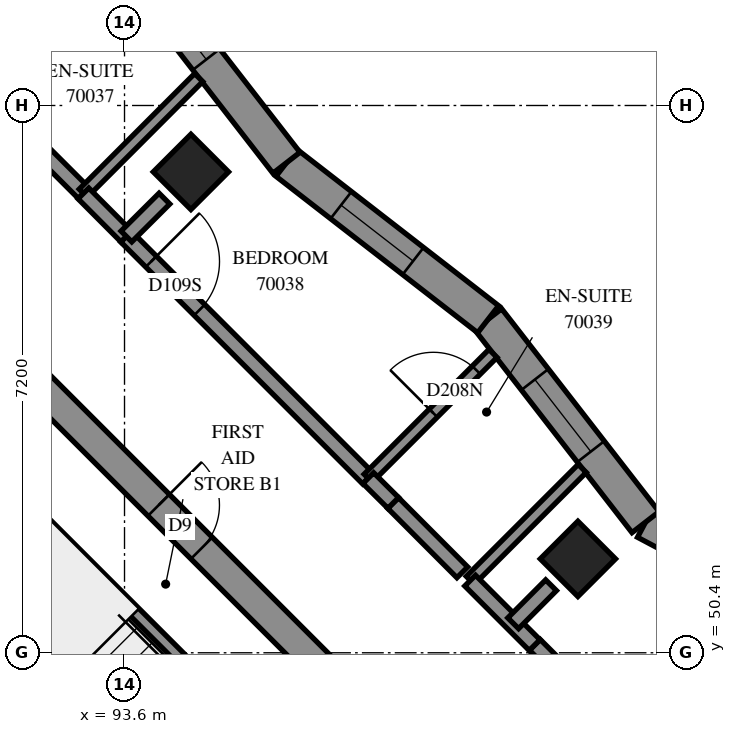
"""IFC4 building model, lengths in metres.
Left out: names, types, materials, properties, quantities, classifications, styles, units other than length and angle.
Written with IfcOpenShell. Run it as: python <this file> out.ifc"""

import sys

from ifc_helpers import new_model, si_unit, direction, frame, frame_2d, origin, origin_2d, place, context, subcontext, project, spatial, polyline, rectangle, outline, extrude, element, fill, save


model = new_model("IFC4")
c1 = context("Model", 3, precision=1e-05, world=origin(), true_north=direction((0.0, 1.0)))
c2 = subcontext(c1, "Body", "Model", "MODEL_VIEW")
j1 = project(units=[si_unit("LENGTHUNIT", "METRE"), si_unit("PLANEANGLEUNIT", "RADIAN")], contexts=[c1])
p1 = place(None, origin())
s1 = spatial("IfcSite", under=j1, at=p1, CompositionType="ELEMENT")
p2 = place(p1, origin())
s2 = spatial("IfcBuilding", under=s1, at=p2, CompositionType="ELEMENT")
p3 = place(p2, frame((0.0, 0.0, 257.4)))
s3 = spatial("IfcBuildingStorey", under=s2, at=p3, CompositionType="ELEMENT", Elevation=257.4)
for number, where, z_axis, x_axis in (
    (1, (94.474, 56.727, 0.0), (0.0, 0.0, 1.0), (0.707, -0.707, 0.0)),
    (2, (99.565, 51.635, 0.0), (0.0, 0.0, 1.0), (0.707, -0.707, 0.0)),
):
    element("IfcColumn", number, at=place(p3, frame(where, z_axis=z_axis, x_axis=x_axis)), inside=s3, PredefinedType="COLUMN", context=c2, shape_type="SweptSolid", body=[
        extrude(rectangle(XDim=0.7, YDim=0.7, at=origin_2d()), origin(), (0.0, 0.0, 1.0), 3.1),
    ])
p4 = place(p3, frame((86.695, 59.696, -0.3), z_axis=(0.0, 0.0, 1.0), x_axis=(0.7071100706, -0.7071034917, 0.0)))
e3 = element("IfcWall", 3, at=p4, inside=s3, PredefinedType="SHEAR", context=c2, shape_type="SweptSolid", body=[
    extrude(rectangle(XDim=15.2, YDim=0.4, at=frame_2d((7.6, 0.0))), origin(), (0.0, 0.0, 1.0), 2.7),
])
p5 = place(p4, frame((10.4, 0.0, 0.3)))
e4 = element("IfcOpeningElement", 4, at=p5, cuts=e3, PredefinedType="OPENING", context=c2, shape_type="SweptSolid", body=[
    extrude(rectangle(XDim=0.8, YDim=2.1, at=frame_2d((0.4, 1.05))), frame((0.0, 0.21, 0.0), z_axis=(0.0, -1.0, 0.0), x_axis=(1.0, 0.0, 0.0)), (0.0, 0.0, 1.0), 0.42),
])
p6 = place(p3, frame((88.958, 51.211, 0.0), z_axis=(0.0, 0.0, 1.0), x_axis=(0.7070998367, -0.7071137256, 0.0)))
e5 = element("IfcWall", 5, at=p6, inside=s3, PredefinedType="SOLIDWALL", context=c2, shape_type="SweptSolid", body=[
    extrude(rectangle(XDim=7.2, YDim=0.3, at=frame_2d((3.6, 0.0))), origin(), (0.0, 0.0, 1.0), 3.1),
])
p7 = place(p3, frame((99.246, 46.544, 0.0), z_axis=(0.0, 0.0, 1.0), x_axis=(0.7071067812, 0.7071067812, 0.0)))
e6 = element("IfcWall", 6, at=p7, inside=s3, PredefinedType="SOLIDWALL", context=c2, shape_type="SweptSolid", body=[
    extrude(outline(polyline([(0.225, -0.225), (6.046, -0.225), (5.437, 0.225), (-0.225, 0.225), (0.225, -0.225)])), origin(), (0.0, 0.0, 1.0), 3.1),
])
p8 = place(p7, frame((0.713, 0.0, 0.6)))
e7 = element("IfcOpeningElement", 7, at=p8, cuts=e6, PredefinedType="OPENING", context=c2, shape_type="SweptSolid", body=[
    extrude(rectangle(XDim=1.8, YDim=1.9, at=frame_2d((0.9, 0.95))), frame((0.0, 0.235, 0.0), z_axis=(0.0, -1.0, 0.0), x_axis=(1.0, 0.0, 0.0)), (0.0, 0.0, 1.0), 0.47),
])
p9 = place(p7, frame((3.931, 0.0, 0.6)))
e8 = element("IfcOpeningElement", 8, at=p9, cuts=e6, PredefinedType="OPENING", context=c2, shape_type="SweptSolid", body=[
    extrude(rectangle(XDim=1.2, YDim=1.9, at=frame_2d((0.6, 0.95))), frame((0.0, 0.235, 0.0), z_axis=(0.0, -1.0, 0.0), x_axis=(1.0, 0.0, 0.0)), (0.0, 0.0, 1.0), 0.47),
])
p10 = place(p3, frame((103.306, 50.604, 0.0), z_axis=(0.0, 0.0, 1.0), x_axis=(-0.8832472045, 0.468907641, 0.0)))
e9 = element("IfcWall", 9, at=p10, inside=s3, PredefinedType="SOLIDWALL", context=c2, shape_type="SweptSolid", body=[
    extrude(outline(polyline([(-0.304, -0.225), (3.181, -0.225), (3.277, 0.225), (0.304, 0.225), (-0.304, -0.225)])), origin(), (0.0, 0.0, 1.0), 3.1),
])
p11 = place(p10, frame((1.167, 0.0, 0.45)))
e10 = element("IfcOpeningElement", 10, at=p11, cuts=e9, PredefinedType="OPENING", context=c2, shape_type="SweptSolid", body=[
    extrude(rectangle(XDim=1.2, YDim=2.55, at=frame_2d((0.6, 1.275))), frame((0.0, 0.235, 0.0), z_axis=(0.0, -1.0, 0.0), x_axis=(1.0, 0.0, 0.0)), (0.0, 0.0, 1.0), 0.47),
])
p12 = place(p3, frame((100.454, 52.118, 0.0), z_axis=(0.0, 0.0, 1.0), x_axis=(-0.6128744429, 0.7901803068, 0.0)))
e11 = element("IfcWall", 11, at=p12, inside=s3, PredefinedType="SOLIDWALL", context=c2, shape_type="SweptSolid", body=[
    extrude(outline(polyline([(0.048, -0.225), (3.407, -0.225), (3.35, 0.225), (-0.048, 0.225), (0.048, -0.225)])), origin(), (0.0, 0.0, 1.0), 3.1),
])
p13 = place(p12, frame((1.175, 0.0, 0.45)))
e12 = element("IfcOpeningElement", 12, at=p13, cuts=e11, PredefinedType="OPENING", context=c2, shape_type="SweptSolid", body=[
    extrude(rectangle(XDim=1.2, YDim=2.55, at=frame_2d((0.6, 1.275))), frame((0.0, 0.235, 0.0), z_axis=(0.0, -1.0, 0.0), x_axis=(1.0, 0.0, 0.0)), (0.0, 0.0, 1.0), 0.47),
])
p14 = place(p3, frame((98.384, 54.788, 0.0), z_axis=(0.0, 0.0, 1.0), x_axis=(-0.7901691849, 0.6128887822, 0.0)))
e13 = element("IfcWall", 13, at=p14, inside=s3, PredefinedType="SOLIDWALL", context=c2, shape_type="SweptSolid", body=[
    extrude(outline(polyline([(-0.028, -0.225), (3.33, -0.225), (3.387, 0.225), (0.028, 0.225), (-0.028, -0.225)])), origin(), (0.0, 0.0, 1.0), 3.1),
])
p15 = place(p14, frame((1.249, 0.0, 0.45)))
e14 = element("IfcOpeningElement", 14, at=p15, cuts=e13, PredefinedType="OPENING", context=c2, shape_type="SweptSolid", body=[
    extrude(rectangle(XDim=1.2, YDim=2.55, at=frame_2d((0.6, 1.275))), frame((0.0, 0.235, 0.0), z_axis=(0.0, -1.0, 0.0), x_axis=(1.0, 0.0, 0.0)), (0.0, 0.0, 1.0), 0.47),
])
p16 = place(p3, frame((95.73, 56.846, 0.0), z_axis=(0.0, 0.0, 1.0), x_axis=(-0.612903202, 0.790158, 0.0)))
e15 = element("IfcWall", 15, at=p16, inside=s3, PredefinedType="SOLIDWALL", context=c2, shape_type="SweptSolid", body=[
    extrude(outline(polyline([(0.028, -0.225), (3.387, -0.225), (3.33, 0.225), (-0.028, 0.225), (0.028, -0.225)])), origin(), (0.0, 0.0, 1.0), 3.1),
])
p17 = place(p16, frame((1.72, 0.0, 0.45)))
e16 = element("IfcOpeningElement", 16, at=p17, cuts=e15, PredefinedType="OPENING", context=c2, shape_type="SweptSolid", body=[
    extrude(rectangle(XDim=1.2, YDim=2.55, at=frame_2d((0.6, 1.275))), frame((0.0, 0.235, 0.0), z_axis=(0.0, -1.0, 0.0), x_axis=(1.0, 0.0, 0.0)), (0.0, 0.0, 1.0), 0.47),
])
p18 = place(p3, frame((91.313, 53.354, 0.0), z_axis=(0.0, 0.0, 1.0), x_axis=(0.7071140275, -0.7070995348, 0.0)))
e17 = element("IfcWall", 17, at=p18, inside=s3, PredefinedType="PARTITIONING", context=c2, shape_type="SweptSolid", body=[
    extrude(rectangle(XDim=6.9, YDim=0.15, at=frame_2d((3.45, 0.0))), origin(), (0.0, 0.0, 1.0), 3.1),
])
p19 = place(p3, frame((88.537, 60.973, 0.0), z_axis=(0.0, 0.0, 1.0), x_axis=(0.7071067812, -0.7071067812, 0.0)))
e18 = element("IfcWall", 18, at=p19, inside=s3, PredefinedType="PARTITIONING", context=c2, shape_type="SweptSolid", body=[
    extrude(rectangle(XDim=6.401, YDim=0.2, at=frame_2d((3.2, 0.0))), origin(), (0.0, 0.0, 1.0), 3.1),
])
p20 = place(p19, frame((0.569, 0.0, 0.0)))
e19 = element("IfcOpeningElement", 19, at=p20, cuts=e18, PredefinedType="OPENING", context=c2, shape_type="SweptSolid", body=[
    extrude(rectangle(XDim=0.9, YDim=2.1, at=frame_2d((0.45, 1.05))), frame((0.0, 0.11, 0.0), z_axis=(0.0, -1.0, 0.0), x_axis=(1.0, 0.0, 0.0)), (0.0, 0.0, 1.0), 0.22),
])
p21 = place(p3, frame((93.621, 55.875, 0.0), z_axis=(0.0, 0.0, 1.0), x_axis=(0.7071067812, -0.7071067812, 0.0)))
e20 = element("IfcWall", 20, at=p21, inside=s3, PredefinedType="PARTITIONING", context=c2, shape_type="SweptSolid", body=[
    extrude(rectangle(XDim=4.5, YDim=0.2, at=frame_2d((2.25, 0.0))), origin(), (0.0, 0.0, 1.0), 3.1),
])
p22 = place(p21, frame((0.465, 0.0, 0.0)))
e21 = element("IfcOpeningElement", 21, at=p22, cuts=e20, PredefinedType="OPENING", context=c2, shape_type="SweptSolid", body=[
    extrude(rectangle(XDim=0.9, YDim=2.1, at=frame_2d((0.45, 1.05))), frame((0.0, 0.11, 0.0), z_axis=(0.0, -1.0, 0.0), x_axis=(1.0, 0.0, 0.0)), (0.0, 0.0, 1.0), 0.22),
])
p23 = place(p3, frame((91.716, 57.788, 0.0), z_axis=(0.0, 0.0, 1.0), x_axis=(0.7071067812, 0.7071067812, 0.0)))
e22 = element("IfcWall", 22, at=p23, inside=s3, PredefinedType="PARTITIONING", context=c2, shape_type="SweptSolid", body=[
    extrude(rectangle(XDim=2.345, YDim=0.15, at=frame_2d((1.172, 0.0))), origin(), (0.0, 0.0, 1.0), 3.1),
])
p24 = place(p23, frame((1.23, 0.0, 0.0)))
e23 = element("IfcOpeningElement", 23, at=p24, cuts=e22, PredefinedType="OPENING", context=c2, shape_type="SweptSolid", body=[
    extrude(rectangle(XDim=0.8, YDim=2.1, at=frame_2d((0.4, 1.05))), frame((0.0, 0.085, 0.0), z_axis=(0.0, -1.0, 0.0), x_axis=(1.0, 0.0, 0.0)), (0.0, 0.0, 1.0), 0.17),
])
p25 = place(p3, frame((96.806, 52.696, 0.0), z_axis=(0.0, 0.0, 1.0), x_axis=(0.7071067812, 0.7071067812, 0.0)))
e24 = element("IfcWall", 24, at=p25, inside=s3, PredefinedType="PARTITIONING", context=c2, shape_type="SweptSolid", body=[
    extrude(rectangle(XDim=2.322, YDim=0.15, at=frame_2d((1.161, 0.0))), origin(), (0.0, 0.0, 1.0), 3.1),
])
p26 = place(p25, frame((1.212, 0.0, 0.0)))
e25 = element("IfcOpeningElement", 25, at=p26, cuts=e24, PredefinedType="OPENING", context=c2, shape_type="SweptSolid", body=[
    extrude(rectangle(XDim=0.8, YDim=2.1, at=frame_2d((0.4, 1.05))), frame((0.0, 0.085, 0.0), z_axis=(0.0, -1.0, 0.0), x_axis=(1.0, 0.0, 0.0)), (0.0, 0.0, 1.0), 0.17),
])
p27 = place(p3, frame((93.057, 56.447, 0.0), z_axis=(0.0, 0.0, 1.0), x_axis=(0.7066180059, 0.7075952188, 0.0)))
e26 = element("IfcWall", 26, at=p27, inside=s3, PredefinedType="PARTITIONING", context=c2, shape_type="SweptSolid", body=[
    extrude(rectangle(XDim=2.149, YDim=0.15, at=frame_2d((1.075, 0.0))), origin(), (0.0, 0.0, 1.0), 3.1),
])
p28 = place(p3, frame((98.149, 51.353, 0.0), z_axis=(0.0, 0.0, 1.0), x_axis=(0.7070827679, 0.7071307936, 0.0)))
e27 = element("IfcWall", 27, at=p28, inside=s3, PredefinedType="PARTITIONING", context=c2, shape_type="SweptSolid", body=[
    extrude(rectangle(XDim=2.082, YDim=0.15, at=frame_2d((1.041, 0.0))), origin(), (0.0, 0.0, 1.0), 3.1),
])
p29 = place(p3, frame((98.998, 50.504, 0.0), z_axis=(0.0, 0.0, 1.0), x_axis=(0.7076063266, -0.7066068826, 0.0)))
e28 = element("IfcWall", 28, at=p29, inside=s3, PredefinedType="PARTITIONING", context=c2, shape_type="SweptSolid", body=[
    extrude(rectangle(XDim=2.001, YDim=0.2, at=frame_2d((1.001, 0.0))), origin(), (0.0, 0.0, 1.0), 3.1),
])
p30 = place(p3, frame((97.134, 52.37, 0.0), z_axis=(0.0, 0.0, 1.0), x_axis=(0.7063301682, -0.7078825422, 0.0)))
e29 = element("IfcWall", 29, at=p30, inside=s3, PredefinedType="PARTITIONING", context=c2, shape_type="SweptSolid", body=[
    extrude(rectangle(XDim=1.288, YDim=0.2, at=frame_2d((0.644, 0.0))), origin(), (0.0, 0.0, 1.0), 3.1),
])
p31 = place(p3, frame((98.147, 51.349, 0.0), z_axis=(0.0, 0.0, 1.0), x_axis=(0.7071067812, -0.7071067812, 0.0)))
e30 = element("IfcWall", 30, at=p31, inside=s3, PredefinedType="PARTITIONING", context=c2, shape_type="SweptSolid", body=[
    extrude(rectangle(XDim=1.199, YDim=0.2, at=frame_2d((0.6, 0.0))), origin(), (0.0, 0.0, 1.0), 3.1),
])
p32 = place(p3, frame((93.059, 56.443, 0.0), z_axis=(0.0, 0.0, 1.0), x_axis=(0.7058541592, -0.7083571881, 0.0)))
e31 = element("IfcWall", 31, at=p32, inside=s3, PredefinedType="PARTITIONING", context=c2, shape_type="SweptSolid", body=[
    extrude(rectangle(XDim=0.799, YDim=0.2, at=frame_2d((0.4, 0.0))), origin(), (0.0, 0.0, 1.0), 3.1),
])
for number, where, z_axis, x_axis in (
    (32, (93.625, 55.877, 0.0), (0.0, 0.0, 1.0), (0.709, 0.706, 0.0)),
    (33, (98.714, 50.788, 0.0), (0.0, 0.0, 1.0), (0.706, 0.709, 0.0)),
):
    element("IfcWall", number, at=place(p3, frame(where, z_axis=z_axis, x_axis=x_axis)), inside=s3, PredefinedType="PARTITIONING", context=c2, shape_type="SweptSolid", body=[
        extrude(rectangle(XDim=0.706, YDim=0.2, at=frame_2d((0.353, 0.0))), origin(), (0.0, 0.0, 1.0), 3.1),
    ])
p33 = place(p3, frame((96.807, 52.697, 0.0), z_axis=(0.0, 0.0, 1.0), x_axis=(0.7092658707, -0.7049410788, 0.0)))
e34 = element("IfcWall", 34, at=p33, inside=s3, PredefinedType="PARTITIONING", context=c2, shape_type="SweptSolid", body=[
    extrude(rectangle(XDim=0.462, YDim=0.2, at=frame_2d((0.231, 0.0))), origin(), (0.0, 0.0, 1.0), 3.1),
])
p34 = place(p13, origin())
e35 = element("IfcWindow", 35, at=p34, inside=s3, PartitioningType="SINGLE_PANEL", PredefinedType="WINDOW", context=c2, shape_type="SweptSolid", body=[
    extrude(rectangle(XDim=1.2, YDim=2.55, at=frame_2d((0.6, 1.275))), frame((0.0, 0.205, 0.0), z_axis=(0.0, -1.0, 0.0), x_axis=(1.0, 0.0, 0.0)), (0.0, 0.0, 1.0), 0.06),
])
fill(e12, e35)
p35 = place(p15, origin())
e36 = element("IfcWindow", 36, at=p35, inside=s3, PartitioningType="SINGLE_PANEL", PredefinedType="WINDOW", context=c2, shape_type="SweptSolid", body=[
    extrude(rectangle(XDim=1.2, YDim=2.55, at=frame_2d((0.6, 1.275))), frame((0.0, 0.205, 0.0), z_axis=(0.0, -1.0, 0.0), x_axis=(1.0, 0.0, 0.0)), (0.0, 0.0, 1.0), 0.06),
])
fill(e14, e36)
p36 = place(p17, origin())
e37 = element("IfcWindow", 37, at=p36, inside=s3, PartitioningType="SINGLE_PANEL", PredefinedType="WINDOW", context=c2, shape_type="SweptSolid", body=[
    extrude(rectangle(XDim=1.2, YDim=2.55, at=frame_2d((0.6, 1.275))), frame((0.0, 0.205, 0.0), z_axis=(0.0, -1.0, 0.0), x_axis=(1.0, 0.0, 0.0)), (0.0, 0.0, 1.0), 0.06),
])
fill(e16, e37)
p37 = place(p5, origin())
e38 = element("IfcDoor", 38, at=p37, inside=s3, OperationType="SINGLE_SWING_RIGHT", PredefinedType="DOOR", context=c2, shape_type="SweptSolid", body=[
    extrude(rectangle(XDim=0.8, YDim=2.1, at=frame_2d((0.4, 1.05))), frame((0.0, 0.025, 0.0), z_axis=(0.0, -1.0, 0.0), x_axis=(1.0, 0.0, 0.0)), (0.0, 0.0, 1.0), 0.05),
])
fill(e4, e38)
p38 = place(p22, origin())
e39 = element("IfcDoor", 39, at=p38, inside=s3, OperationType="SINGLE_SWING_LEFT", PredefinedType="DOOR", context=c2, shape_type="SweptSolid", body=[
    extrude(rectangle(XDim=0.9, YDim=2.1, at=frame_2d((0.45, 1.05))), frame((0.0, 0.025, 0.0), z_axis=(0.0, -1.0, 0.0), x_axis=(1.0, 0.0, 0.0)), (0.0, 0.0, 1.0), 0.05),
])
fill(e21, e39)
p39 = place(p26, origin())
e40 = element("IfcDoor", 40, at=p39, inside=s3, OperationType="SINGLE_SWING_RIGHT", PredefinedType="DOOR", context=c2, shape_type="SweptSolid", body=[
    extrude(rectangle(XDim=0.8, YDim=2.1, at=frame_2d((0.4, 1.05))), frame((0.0, 0.025, 0.0), z_axis=(0.0, -1.0, 0.0), x_axis=(1.0, 0.0, 0.0)), (0.0, 0.0, 1.0), 0.05),
])
fill(e25, e40)
save(model, sys.argv[1])
